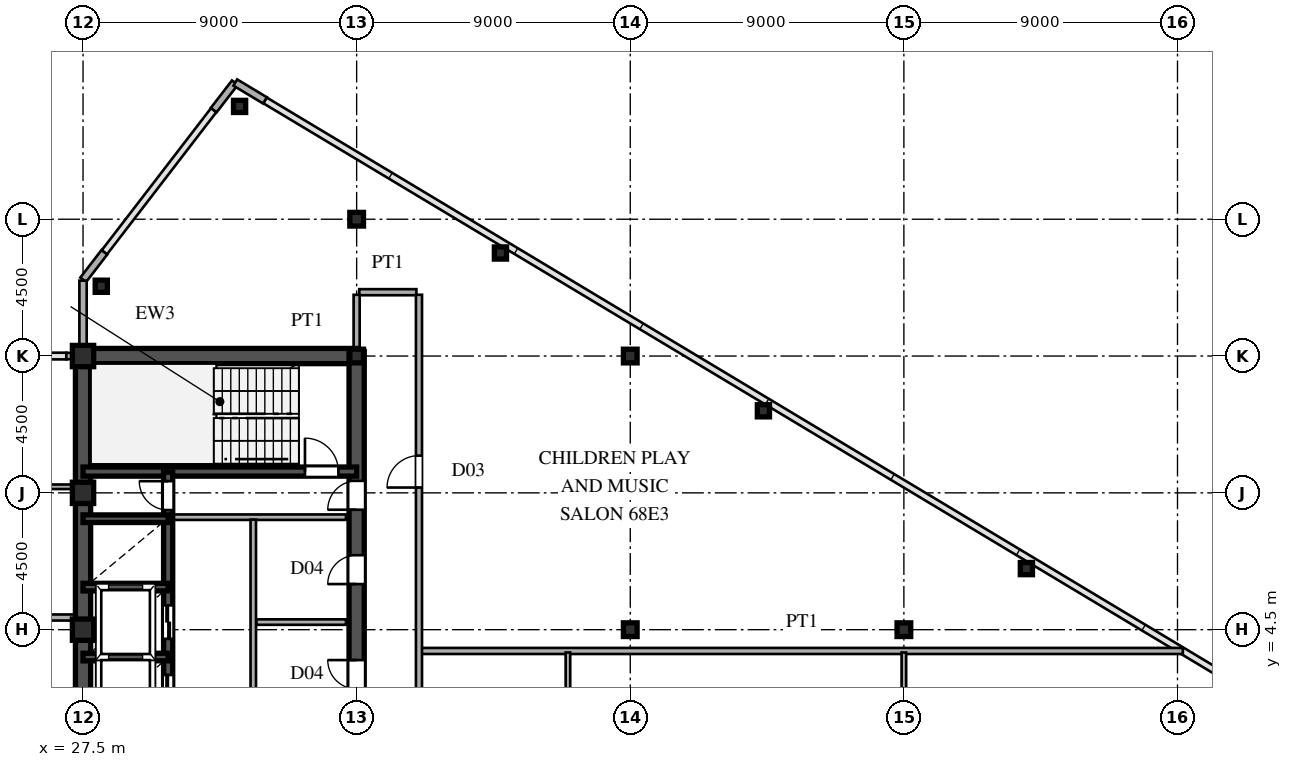
"""IFC4 building model, lengths in metres.
Left out: names, types, materials, properties, quantities, classifications, styles, units other than length and angle.
Written with IfcOpenShell. Run it as: python <this file> out.ifc"""

import sys

from ifc_helpers import new_model, si_unit, direction, frame, frame_2d, origin, origin_2d, place, context, subcontext, project, spatial, rectangle, hollow_rectangle, i_section, extrude, source, transform, mapped, element, fill, save


model = new_model("IFC4")
c1 = context("Model", 3, precision=1e-05, world=origin(), true_north=direction((0.0, 1.0)))
c2 = subcontext(c1, "Body", "Model", "MODEL_VIEW")
j1 = project(units=[si_unit("LENGTHUNIT", "METRE"), si_unit("PLANEANGLEUNIT", "RADIAN")], contexts=[c1])
p1 = place(None, origin())
s1 = spatial("IfcSite", under=j1, at=p1, CompositionType="ELEMENT")
p2 = place(p1, origin())
s2 = spatial("IfcBuilding", under=s1, at=p2, CompositionType="ELEMENT")
p3 = place(p2, frame((0.0, 0.0, 258.15)))
s3 = spatial("IfcBuildingStorey", under=s2, at=p3, CompositionType="ELEMENT", Elevation=258.15)
m1 = source(origin(), c2, "Body", "SweptSolid", [
    extrude(hollow_rectangle(XDim=0.7, YDim=0.7, WallThickness=0.03, at=origin_2d()), origin(), (0.0, 0.0, 1.0), 3.75),
])
for number, where, z_axis, x_axis in (
    (1, (27.5, 4.5, 0.0), (0.0, 0.0, 1.0), (1.0, 0.0, 0.0)),
    (2, (27.5, 9.0, 0.0), (0.0, 0.0, 1.0), (1.0, 0.0, 0.0)),
    (3, (27.5, 13.5, 0.0), (0.0, 0.0, 1.0), (1.0, 0.0, 0.0)),
):
    element("IfcColumn", number, at=place(p3, frame(where, z_axis=z_axis, x_axis=x_axis)), inside=s3, PredefinedType="COLUMN", context=c2, shape_type="MappedRepresentation", body=[
        mapped(m1, transform((0.0, 0.0, 0.0), scale=1.0)),
    ])
m2 = source(origin(), c2, "Body", "SweptSolid", [
    extrude(i_section(OverallWidth=0.45, OverallDepth=0.45, WebThickness=0.016, FlangeThickness=0.025, at=origin_2d()), origin(), (0.0, 0.0, 1.0), 3.75),
])
for number, where, z_axis, x_axis in (
    (4, (36.5, 13.5, 0.0), (0.0, 0.0, 1.0), (1.0, 0.0, 0.0)),
    (5, (36.5, 18.0, 0.0), (0.0, 0.0, 1.0), (1.0, 0.0, 0.0)),
    (6, (45.5, 4.5, 0.0), (0.0, 0.0, 1.0), (1.0, 0.0, 0.0)),
    (7, (45.5, 13.5, 0.0), (0.0, 0.0, 1.0), (1.0, 0.0, 0.0)),
    (8, (54.5, 4.5, 0.0), (0.0, 0.0, 1.0), (1.0, 0.0, 0.0)),
):
    element("IfcColumn", number, at=place(p3, frame(where, z_axis=z_axis, x_axis=x_axis)), inside=s3, PredefinedType="COLUMN", context=c2, shape_type="MappedRepresentation", body=[
        mapped(m2, transform((0.0, 0.0, 0.0), scale=1.0)),
    ])
m3 = source(origin(), c2, "Body", "SweptSolid", [
    extrude(hollow_rectangle(XDim=0.4, YDim=0.4, WallThickness=0.016, at=origin_2d()), origin(), (0.0, 0.0, 1.0), 3.75),
])
for number, where, z_axis, x_axis in (
    (9, (32.65, 21.71, 0.0), (0.0, 0.0, 1.0), (1.0, 0.0, 0.0)),
    (10, (28.1, 15.796, 0.0), (0.0, 0.0, 1.0), (1.0, 0.0, 0.0)),
    (11, (41.23, 16.889, 0.0), (0.0, 0.0, 1.0), (1.0, 0.0, 0.0)),
    (12, (49.88, 11.699, 0.0), (0.0, 0.0, 1.0), (1.0, 0.0, 0.0)),
    (13, (58.53, 6.509, 0.0), (0.0, 0.0, 1.0), (1.0, 0.0, 0.0)),
):
    element("IfcColumn", number, at=place(p3, frame(where, z_axis=z_axis, x_axis=x_axis)), inside=s3, PredefinedType="COLUMN", context=c2, shape_type="MappedRepresentation", body=[
        mapped(m3, transform((0.0, 0.0, 0.0), scale=1.0)),
    ])
for number, where, z_axis, x_axis in (
    (14, (33.486, 21.908, 0.0), (0.0, 0.0, 1.0), (-0.857, 0.515, 0.0)),
    (15, (32.494, 22.492, 0.0), (0.0, 0.0, 1.0), (-0.61, -0.793, 0.0)),
    (16, (28.201, 16.912, 0.0), (0.0, 0.0, 1.0), (-0.61, -0.793, 0.0)),
):
    element("IfcWall", number, at=place(p3, frame(where, z_axis=z_axis, x_axis=x_axis)), inside=s3, PredefinedType="SOLIDWALL", context=c2, shape_type="SweptSolid", body=[
        extrude(rectangle(XDim=1.14, YDim=0.24, at=frame_2d((0.57, 0.0))), origin(), (0.0, 0.0, 1.0), 3.53),
    ])
p4 = place(p3, frame((27.5, 13.755, 0.0), z_axis=(0.0, 0.0, 1.0), x_axis=(0.0, 1.0, 0.0)))
e17 = element("IfcWall", 17, at=p4, inside=s3, PredefinedType="SOLIDWALL", context=c2, shape_type="SweptSolid", body=[
    extrude(rectangle(XDim=0.62, YDim=0.24, at=frame_2d((0.31, 0.0))), origin(), (0.0, 0.0, 1.0), 3.03),
])
p5 = place(p3, frame((27.5, 14.375, 0.0), z_axis=(0.0, 0.0, 1.0), x_axis=(0.0, 1.0, 0.0)))
e18 = element("IfcWall", 18, at=p5, inside=s3, PredefinedType="SOLIDWALL", context=c2, shape_type="SweptSolid", body=[
    extrude(rectangle(XDim=1.605, YDim=0.24, at=frame_2d((0.803, 0.0))), origin(), (0.0, 0.0, 1.0), 3.53),
])
p6 = place(p3, frame((26.95, 13.5, 0.0), z_axis=(0.0, 0.0, 1.0), x_axis=(1.0, 0.0, 0.0)))
e19 = element("IfcWall", 19, at=p6, inside=s3, PredefinedType="SOLIDWALL", context=c2, shape_type="SweptSolid", body=[
    extrude(rectangle(XDim=0.54, YDim=0.21, at=frame_2d((0.27, 0.0))), origin(), (0.0, 0.0, 1.0), 3.03),
])
p7 = place(p3, frame((27.5, 1.3, 0.0), z_axis=(0.0, 0.0, 1.0), x_axis=(0.0, 1.0, 0.0)))
e20 = element("IfcWall", 20, at=p7, inside=s3, PredefinedType="SHEAR", context=c2, shape_type="SweptSolid", body=[
    extrude(rectangle(XDim=12.2, YDim=0.5, at=frame_2d((6.1, 0.0))), origin(), (0.0, 0.0, 1.0), 3.53),
])
p8 = place(p3, frame((27.5, 13.5, 0.0), z_axis=(0.0, 0.0, 1.0), x_axis=(1.0, 0.0, 0.0)))
e21 = element("IfcWall", 21, at=p8, inside=s3, PredefinedType="SHEAR", context=c2, shape_type="SweptSolid", body=[
    extrude(rectangle(XDim=9.0, YDim=0.5, at=frame_2d((4.5, 0.0))), origin(), (0.0, 0.0, 1.0), 3.53),
])
p9 = place(p3, frame((36.5, 8.2, 0.0), z_axis=(0.0, 0.0, 1.0), x_axis=(0.0, 1.0, 0.0)))
e22 = element("IfcWall", 22, at=p9, inside=s3, PredefinedType="SHEAR", context=c2, shape_type="SweptSolid", body=[
    extrude(rectangle(XDim=5.45, YDim=0.5, at=frame_2d((2.725, 0.0))), origin(), (0.0, 0.0, 1.0), 3.53),
])
p10 = place(p9, frame((0.245, 0.0, 0.0)))
e23 = element("IfcOpeningElement", 23, at=p10, cuts=e22, PredefinedType="OPENING", context=c2, shape_type="SweptSolid", body=[
    extrude(rectangle(XDim=0.95, YDim=2.15, at=frame_2d((0.475, 1.075))), frame((0.0, 0.26, 0.0), z_axis=(0.0, -1.0, 0.0), x_axis=(1.0, 0.0, 0.0)), (0.0, 0.0, 1.0), 0.52),
])
p11 = place(p3, frame((36.5, 1.3, 0.0), z_axis=(0.0, 0.0, 1.0), x_axis=(0.0, 1.0, 0.0)))
e24 = element("IfcWall", 24, at=p11, inside=s3, PredefinedType="SHEAR", context=c2, shape_type="SweptSolid", body=[
    extrude(rectangle(XDim=3.45, YDim=0.5, at=frame_2d((1.725, 0.0))), origin(), (0.0, 0.0, 1.0), 3.53),
])
p12 = place(p11, frame((1.25, 0.0, 0.0)))
e25 = element("IfcOpeningElement", 25, at=p12, cuts=e24, PredefinedType="OPENING", context=c2, shape_type="SweptSolid", body=[
    extrude(rectangle(XDim=0.95, YDim=2.15, at=frame_2d((0.475, 1.075))), frame((0.0, 0.26, 0.0), z_axis=(0.0, -1.0, 0.0), x_axis=(1.0, 0.0, 0.0)), (0.0, 0.0, 1.0), 0.52),
])
p13 = place(p3, frame((36.5, 4.75, 0.0), z_axis=(0.0, 0.0, 1.0), x_axis=(0.0, 1.0, 0.0)))
e26 = element("IfcWall", 26, at=p13, inside=s3, PredefinedType="SHEAR", context=c2, shape_type="SweptSolid", body=[
    extrude(rectangle(XDim=3.45, YDim=0.5, at=frame_2d((1.725, 0.0))), origin(), (0.0, 0.0, 1.0), 3.53),
])
p14 = place(p13, frame((1.25, 0.0, 0.0)))
e27 = element("IfcOpeningElement", 27, at=p14, cuts=e26, PredefinedType="OPENING", context=c2, shape_type="SweptSolid", body=[
    extrude(rectangle(XDim=0.95, YDim=2.15, at=frame_2d((0.475, 1.075))), frame((0.0, 0.26, 0.0), z_axis=(0.0, -1.0, 0.0), x_axis=(1.0, 0.0, 0.0)), (0.0, 0.0, 1.0), 0.52),
])
p15 = place(p3, frame((27.5, 9.7, 0.0), z_axis=(0.0, 0.0, 1.0), x_axis=(1.0, 0.0, 0.0)))
e28 = element("IfcWall", 28, at=p15, inside=s3, PredefinedType="SHEAR", context=c2, shape_type="SweptSolid", body=[
    extrude(rectangle(XDim=9.0, YDim=0.3, at=frame_2d((4.5, 0.0))), origin(), (0.0, 0.0, 1.0), 3.53),
])
p16 = place(p15, frame((7.3, 0.0, 0.0)))
e29 = element("IfcOpeningElement", 29, at=p16, cuts=e28, PredefinedType="OPENING", context=c2, shape_type="SweptSolid", body=[
    extrude(rectangle(XDim=1.1, YDim=2.2, at=frame_2d((0.55, 1.1))), frame((0.0, 0.16, 0.0), z_axis=(0.0, -1.0, 0.0), x_axis=(1.0, 0.0, 0.0)), (0.0, 0.0, 1.0), 0.32),
])
for number, where, z_axis, x_axis in (
    (30, (27.5, 3.6, 0.0), (0.0, 0.0, 1.0), (1.0, 0.0, 0.0)),
    (31, (27.5, 5.9, 0.0), (0.0, 0.0, 1.0), (1.0, 0.0, 0.0)),
    (32, (27.5, 8.15, 0.0), (0.0, 0.0, 1.0), (1.0, 0.0, 0.0)),
):
    element("IfcWall", number, at=place(p3, frame(where, z_axis=z_axis, x_axis=x_axis)), inside=s3, PredefinedType="SHEAR", context=c2, shape_type="SweptSolid", body=[
        extrude(rectangle(XDim=2.8, YDim=0.25, at=frame_2d((1.4, 0.0))), origin(), (0.0, 0.0, 1.0), 3.53),
    ])
p17 = place(p3, frame((30.3, 1.32, 0.0), z_axis=(0.0, 0.0, 1.0), x_axis=(0.0, 1.0, 0.0)))
e33 = element("IfcWall", 33, at=p17, inside=s3, PredefinedType="SHEAR", context=c2, shape_type="SweptSolid", body=[
    extrude(rectangle(XDim=2.28, YDim=0.3, at=frame_2d((1.14, 0.0))), origin(), (0.0, 0.0, 1.0), 3.53),
])
p18 = place(p17, frame((0.59, 0.0, 0.0)))
e34 = element("IfcOpeningElement", 34, at=p18, cuts=e33, PredefinedType="OPENING", context=c2, shape_type="SweptSolid", body=[
    extrude(rectangle(XDim=1.1, YDim=2.2, at=frame_2d((0.55, 1.1))), frame((0.0, 0.16, 0.0), z_axis=(0.0, -1.0, 0.0), x_axis=(1.0, 0.0, 0.0)), (0.0, 0.0, 1.0), 0.32),
])
p19 = place(p3, frame((30.3, 3.6, 0.0), z_axis=(0.0, 0.0, 1.0), x_axis=(0.0, 1.0, 0.0)))
e35 = element("IfcWall", 35, at=p19, inside=s3, PredefinedType="SHEAR", context=c2, shape_type="SweptSolid", body=[
    extrude(rectangle(XDim=2.3, YDim=0.3, at=frame_2d((1.15, 0.0))), origin(), (0.0, 0.0, 1.0), 3.53),
])
p20 = place(p19, frame((0.6, 0.0, 0.0)))
e36 = element("IfcOpeningElement", 36, at=p20, cuts=e35, PredefinedType="OPENING", context=c2, shape_type="SweptSolid", body=[
    extrude(rectangle(XDim=1.1, YDim=2.2, at=frame_2d((0.55, 1.1))), frame((0.0, 0.16, 0.0), z_axis=(0.0, -1.0, 0.0), x_axis=(1.0, 0.0, 0.0)), (0.0, 0.0, 1.0), 0.32),
])
p21 = place(p3, frame((30.3, 5.9, 0.0), z_axis=(0.0, 0.0, 1.0), x_axis=(0.0, 1.0, 0.0)))
e37 = element("IfcWall", 37, at=p21, inside=s3, PredefinedType="SHEAR", context=c2, shape_type="SweptSolid", body=[
    extrude(rectangle(XDim=2.25, YDim=0.3, at=frame_2d((1.125, 0.0))), origin(), (0.0, 0.0, 1.0), 3.53),
])
p22 = place(p3, frame((30.3, 8.15, 0.0), z_axis=(0.0, 0.0, 1.0), x_axis=(0.0, 1.0, 0.0)))
e38 = element("IfcWall", 38, at=p22, inside=s3, PredefinedType="SHEAR", context=c2, shape_type="SweptSolid", body=[
    extrude(rectangle(XDim=1.53, YDim=0.3, at=frame_2d((0.765, 0.0))), origin(), (0.0, 0.0, 1.0), 3.53),
])
p23 = place(p22, frame((0.285, 0.0, 0.0)))
e39 = element("IfcOpeningElement", 39, at=p23, cuts=e38, PredefinedType="OPENING", context=c2, shape_type="SweptSolid", body=[
    extrude(rectangle(XDim=0.95, YDim=2.15, at=frame_2d((0.475, 1.075))), frame((0.0, 0.16, 0.0), z_axis=(0.0, -1.0, 0.0), x_axis=(1.0, 0.0, 0.0)), (0.0, 0.0, 1.0), 0.32),
])
p24 = place(p3, frame((30.45, 8.2, 0.0), z_axis=(0.0, 0.0, 1.0), x_axis=(1.0, 0.0, 0.0)))
e40 = element("IfcWall", 40, at=p24, inside=s3, PredefinedType="PARTITIONING", context=c2, shape_type="SweptSolid", body=[
    extrude(rectangle(XDim=5.7, YDim=0.18, at=frame_2d((2.85, 0.0))), origin(), (0.0, 0.0, 1.0), 3.53),
])
p25 = place(p3, frame((33.1, 1.38, 0.0), z_axis=(0.0, 0.0, 1.0), x_axis=(0.0, 1.0, 0.0)))
e41 = element("IfcWall", 41, at=p25, inside=s3, PredefinedType="PARTITIONING", context=c2, shape_type="SweptSolid", body=[
    extrude(rectangle(XDim=6.74, YDim=0.18, at=frame_2d((3.37, 0.0))), origin(), (0.0, 0.0, 1.0), 3.53),
])
p26 = place(p3, frame((33.2, 4.75, 0.0), z_axis=(0.0, 0.0, 1.0), x_axis=(1.0, 0.0, 0.0)))
e42 = element("IfcWall", 42, at=p26, inside=s3, PredefinedType="PARTITIONING", context=c2, shape_type="SweptSolid", body=[
    extrude(rectangle(XDim=2.95, YDim=0.18, at=frame_2d((1.475, 0.0))), origin(), (0.0, 0.0, 1.0), 3.53),
])
p27 = place(p3, frame((38.63, 3.8, 0.0), z_axis=(0.0, 0.0, 1.0), x_axis=(1.0, 0.0, 0.0)))
e43 = element("IfcWall", 43, at=p27, inside=s3, PredefinedType="PARTITIONING", context=c2, shape_type="SweptSolid", body=[
    extrude(rectangle(XDim=25.046, YDim=0.2, at=frame_2d((12.523, 0.0))), origin(), (0.0, 0.0, 1.0), 3.53),
])
p28 = place(p3, frame((-27.245, 4.9, 0.0), z_axis=(0.0, 0.0, 1.0), x_axis=(1.0, 0.0, 0.0)))
e44 = element("IfcWall", 44, at=p28, inside=s3, PredefinedType="PARTITIONING", context=c2, shape_type="SweptSolid", body=[
    extrude(rectangle(XDim=54.49, YDim=0.2, at=frame_2d((27.245, 0.0))), origin(), (0.0, 0.0, 1.0), 3.53),
])
p29 = place(p28, frame((22.47, 0.0, 0.0)))
e45 = element("IfcOpeningElement", 45, at=p29, cuts=e44, PredefinedType="OPENING", context=c2, shape_type="SweptSolid", body=[
    extrude(rectangle(XDim=1.05, YDim=2.25, at=frame_2d((0.525, 1.125))), frame((0.0, 0.11, 0.0), z_axis=(0.0, -1.0, 0.0), x_axis=(1.0, 0.0, 0.0)), (0.0, 0.0, 1.0), 0.22),
])
p30 = place(p3, frame((4.585, 9.2, 0.0), z_axis=(0.0, 0.0, 1.0), x_axis=(1.0, 0.0, 0.0)))
e46 = element("IfcWall", 46, at=p30, inside=s3, PredefinedType="PARTITIONING", context=c2, shape_type="SweptSolid", body=[
    extrude(rectangle(XDim=22.66, YDim=0.15, at=frame_2d((11.33, 0.0))), origin(), (0.0, 0.0, 1.0), 3.53),
])
p31 = place(p30, frame((3.94, 0.0, 0.0)))
e47 = element("IfcOpeningElement", 47, at=p31, cuts=e46, PredefinedType="OPENING", context=c2, shape_type="SweptSolid", body=[
    extrude(rectangle(XDim=0.95, YDim=2.15, at=frame_2d((0.475, 1.075))), frame((0.0, 0.085, 0.0), z_axis=(0.0, -1.0, 0.0), x_axis=(1.0, 0.0, 0.0)), (0.0, 0.0, 1.0), 0.17),
])
p32 = place(p30, frame((11.94, 0.0, 0.0)))
e48 = element("IfcOpeningElement", 48, at=p32, cuts=e46, PredefinedType="OPENING", context=c2, shape_type="SweptSolid", body=[
    extrude(rectangle(XDim=0.95, YDim=2.15, at=frame_2d((0.475, 1.075))), frame((0.0, 0.085, 0.0), z_axis=(0.0, -1.0, 0.0), x_axis=(1.0, 0.0, 0.0)), (0.0, 0.0, 1.0), 0.17),
])
p33 = place(p30, frame((18.94, 0.0, 0.0)))
e49 = element("IfcOpeningElement", 49, at=p33, cuts=e46, PredefinedType="OPENING", context=c2, shape_type="SweptSolid", body=[
    extrude(rectangle(XDim=0.95, YDim=2.15, at=frame_2d((0.475, 1.075))), frame((0.0, 0.085, 0.0), z_axis=(0.0, -1.0, 0.0), x_axis=(1.0, 0.0, 0.0)), (0.0, 0.0, 1.0), 0.17),
])
p34 = place(p3, frame((36.585, 15.6, 0.0), z_axis=(0.0, 0.0, 1.0), x_axis=(1.0, 0.0, 0.0)))
e50 = element("IfcWall", 50, at=p34, inside=s3, PredefinedType="PARTITIONING", context=c2, shape_type="SweptSolid", body=[
    extrude(rectangle(XDim=1.88, YDim=0.2, at=frame_2d((0.94, 0.0))), origin(), (0.0, 0.0, 1.0), 3.53),
])
p35 = place(p3, frame((36.5, 13.755, 0.0), z_axis=(0.0, 0.0, 1.0), x_axis=(0.0, 1.0, 0.0)))
e51 = element("IfcWall", 51, at=p35, inside=s3, PredefinedType="PARTITIONING", context=c2, shape_type="SweptSolid", body=[
    extrude(rectangle(XDim=1.76, YDim=0.2, at=frame_2d((0.88, 0.0))), origin(), (0.0, 0.0, 1.0), 2.93),
])
p36 = place(p3, frame((38.55, -15.515, 0.0), z_axis=(0.0, 0.0, 1.0), x_axis=(0.0, 1.0, 0.0)))
e52 = element("IfcWall", 52, at=p36, inside=s3, PredefinedType="PARTITIONING", context=c2, shape_type="SweptSolid", body=[
    extrude(rectangle(XDim=31.03, YDim=0.2, at=frame_2d((15.515, 0.0))), origin(), (0.0, 0.0, 1.0), 3.53),
])
p37 = place(p36, frame((2.39, 0.0, 0.0)))
e53 = element("IfcOpeningElement", 53, at=p37, cuts=e52, PredefinedType="OPENING", context=c2, shape_type="SweptSolid", body=[
    extrude(rectangle(XDim=1.05, YDim=2.25, at=frame_2d((0.525, 1.125))), frame((0.0, 0.11, 0.0), z_axis=(0.0, -1.0, 0.0), x_axis=(1.0, 0.0, 0.0)), (0.0, 0.0, 1.0), 0.22),
])
p38 = place(p36, frame((11.889, 0.0, 0.0)))
e54 = element("IfcOpeningElement", 54, at=p38, cuts=e52, PredefinedType="OPENING", context=c2, shape_type="SweptSolid", body=[
    extrude(rectangle(XDim=1.05, YDim=2.25, at=frame_2d((0.525, 1.125))), frame((0.0, 0.11, 0.0), z_axis=(0.0, -1.0, 0.0), x_axis=(1.0, 0.0, 0.0)), (0.0, 0.0, 1.0), 0.22),
])
p39 = place(p36, frame((24.69, 0.0, 0.0)))
e55 = element("IfcOpeningElement", 55, at=p39, cuts=e52, PredefinedType="OPENING", context=c2, shape_type="SweptSolid", body=[
    extrude(rectangle(XDim=1.05, YDim=2.25, at=frame_2d((0.525, 1.125))), frame((0.0, 0.11, 0.0), z_axis=(0.0, -1.0, 0.0), x_axis=(1.0, 0.0, 0.0)), (0.0, 0.0, 1.0), 0.22),
])
p40 = place(p3, frame((43.45, -0.168, 0.0), z_axis=(0.0, 0.0, 1.0), x_axis=(0.0, 1.0, 0.0)))
e56 = element("IfcWall", 56, at=p40, inside=s3, PredefinedType="PARTITIONING", context=c2, shape_type="SweptSolid", body=[
    extrude(rectangle(XDim=3.918, YDim=0.15, at=frame_2d((1.959, 0.0))), origin(), (0.0, 0.0, 1.0), 3.53),
])
p41 = place(p3, frame((54.5, -9.335, 0.0), z_axis=(0.0, 0.0, 1.0), x_axis=(0.0, 1.0, 0.0)))
e57 = element("IfcWall", 57, at=p41, inside=s3, PredefinedType="PARTITIONING", context=c2, shape_type="SweptSolid", body=[
    extrude(rectangle(XDim=13.085, YDim=0.15, at=frame_2d((6.542, 0.0))), origin(), (0.0, 0.0, 1.0), 2.93),
])
p42 = place(p41, frame((5.96, 0.0, 0.0)))
e58 = element("IfcOpeningElement", 58, at=p42, cuts=e57, PredefinedType="OPENING", context=c2, shape_type="SweptSolid", body=[
    extrude(rectangle(XDim=0.95, YDim=2.15, at=frame_2d((0.475, 1.075))), frame((0.0, 0.085, 0.0), z_axis=(0.0, -1.0, 0.0), x_axis=(1.0, 0.0, 0.0)), (0.0, 0.0, 1.0), 0.17),
])
p43 = place(p41, frame((1.643, 0.0, 0.0)))
e59 = element("IfcOpeningElement", 59, at=p43, cuts=e57, PredefinedType="OPENING", context=c2, shape_type="SweptSolid", body=[
    extrude(rectangle(XDim=0.95, YDim=2.15, at=frame_2d((0.475, 1.075))), frame((0.0, 0.085, 0.0), z_axis=(0.0, -1.0, 0.0), x_axis=(1.0, 0.0, 0.0)), (0.0, 0.0, 1.0), 0.17),
])
p44 = place(p41, frame((10.427, 0.0, 0.0)))
e60 = element("IfcOpeningElement", 60, at=p44, cuts=e57, PredefinedType="OPENING", context=c2, shape_type="SweptSolid", body=[
    extrude(rectangle(XDim=0.95, YDim=2.15, at=frame_2d((0.475, 1.075))), frame((0.0, 0.085, 0.0), z_axis=(0.0, -1.0, 0.0), x_axis=(1.0, 0.0, 0.0)), (0.0, 0.0, 1.0), 0.17),
])
m4 = source(origin(), c2, "Body", "SweptSolid", [
    extrude(rectangle(XDim=0.95, YDim=2.15, at=frame_2d((0.475, 1.075))), frame((0.0, 0.025, 0.0), z_axis=(0.0, -1.0, 0.0), x_axis=(1.0, 0.0, 0.0)), (0.0, 0.0, 1.0), 0.05),
])
p45 = place(p10, origin())
e61 = element("IfcDoor", 61, at=p45, inside=s3, OperationType="SINGLE_SWING_LEFT", PredefinedType="DOOR", context=c2, shape_type="MappedRepresentation", body=[
    mapped(m4, transform((0.0, 0.0, 0.0), scale=1.0)),
])
fill(e23, e61)
p46 = place(p12, origin())
e62 = element("IfcDoor", 62, at=p46, inside=s3, OperationType="SINGLE_SWING_RIGHT", PredefinedType="DOOR", context=c2, shape_type="MappedRepresentation", body=[
    mapped(m4, transform((0.0, 0.0, 0.0), scale=1.0)),
])
fill(e25, e62)
p47 = place(p14, origin())
e63 = element("IfcDoor", 63, at=p47, inside=s3, OperationType="SINGLE_SWING_LEFT", PredefinedType="DOOR", context=c2, shape_type="MappedRepresentation", body=[
    mapped(m4, transform((0.0, 0.0, 0.0), scale=1.0)),
])
fill(e27, e63)
m5 = source(origin(), c2, "Body", "SweptSolid", [
    extrude(rectangle(XDim=1.1, YDim=2.2, at=frame_2d((0.55, 1.1))), frame((0.0, 0.025, 0.0), z_axis=(0.0, -1.0, 0.0), x_axis=(1.0, 0.0, 0.0)), (0.0, 0.0, 1.0), 0.05),
])
p48 = place(p16, origin())
e64 = element("IfcDoor", 64, at=p48, inside=s3, OperationType="SINGLE_SWING_LEFT", PredefinedType="DOOR", context=c2, shape_type="MappedRepresentation", body=[
    mapped(m5, transform((0.0, 0.0, 0.0), scale=1.0)),
])
fill(e29, e64)
m6 = source(origin(), c2, "Body", "SweptSolid", [
    extrude(rectangle(XDim=1.1, YDim=2.2, at=frame_2d((0.55, 1.1))), frame((0.0, 0.025, 0.0), z_axis=(0.0, -1.0, 0.0), x_axis=(1.0, 0.0, 0.0)), (0.0, 0.0, 1.0), 0.05),
])
p49 = place(p18, origin())
e65 = element("IfcDoor", 65, at=p49, inside=s3, OperationType="DOUBLE_DOOR_SLIDING", PredefinedType="DOOR", context=c2, shape_type="MappedRepresentation", body=[
    mapped(m6, transform((0.0, 0.0, 0.0), scale=1.0)),
])
fill(e34, e65)
p50 = place(p20, origin())
e66 = element("IfcDoor", 66, at=p50, inside=s3, OperationType="DOUBLE_DOOR_SLIDING", PredefinedType="DOOR", context=c2, shape_type="MappedRepresentation", body=[
    mapped(m6, transform((0.0, 0.0, 0.0), scale=1.0)),
])
fill(e36, e66)
p51 = place(p23, origin())
e67 = element("IfcDoor", 67, at=p51, inside=s3, OperationType="SINGLE_SWING_RIGHT", PredefinedType="DOOR", context=c2, shape_type="MappedRepresentation", body=[
    mapped(m4, transform((0.0, 0.0, 0.0), scale=1.0)),
])
fill(e39, e67)
m7 = source(origin(), c2, "Body", "SweptSolid", [
    extrude(rectangle(XDim=1.05, YDim=2.25, at=frame_2d((0.525, 1.125))), frame((0.0, 0.025, 0.0), z_axis=(0.0, -1.0, 0.0), x_axis=(1.0, 0.0, 0.0)), (0.0, 0.0, 1.0), 0.05),
])
p52 = place(p39, origin())
e68 = element("IfcDoor", 68, at=p52, inside=s3, OperationType="SINGLE_SWING_LEFT", PredefinedType="DOOR", context=c2, shape_type="MappedRepresentation", body=[
    mapped(m7, transform((0.0, 0.0, 0.0), scale=1.0)),
])
fill(e55, e68)
save(model, sys.argv[1])
